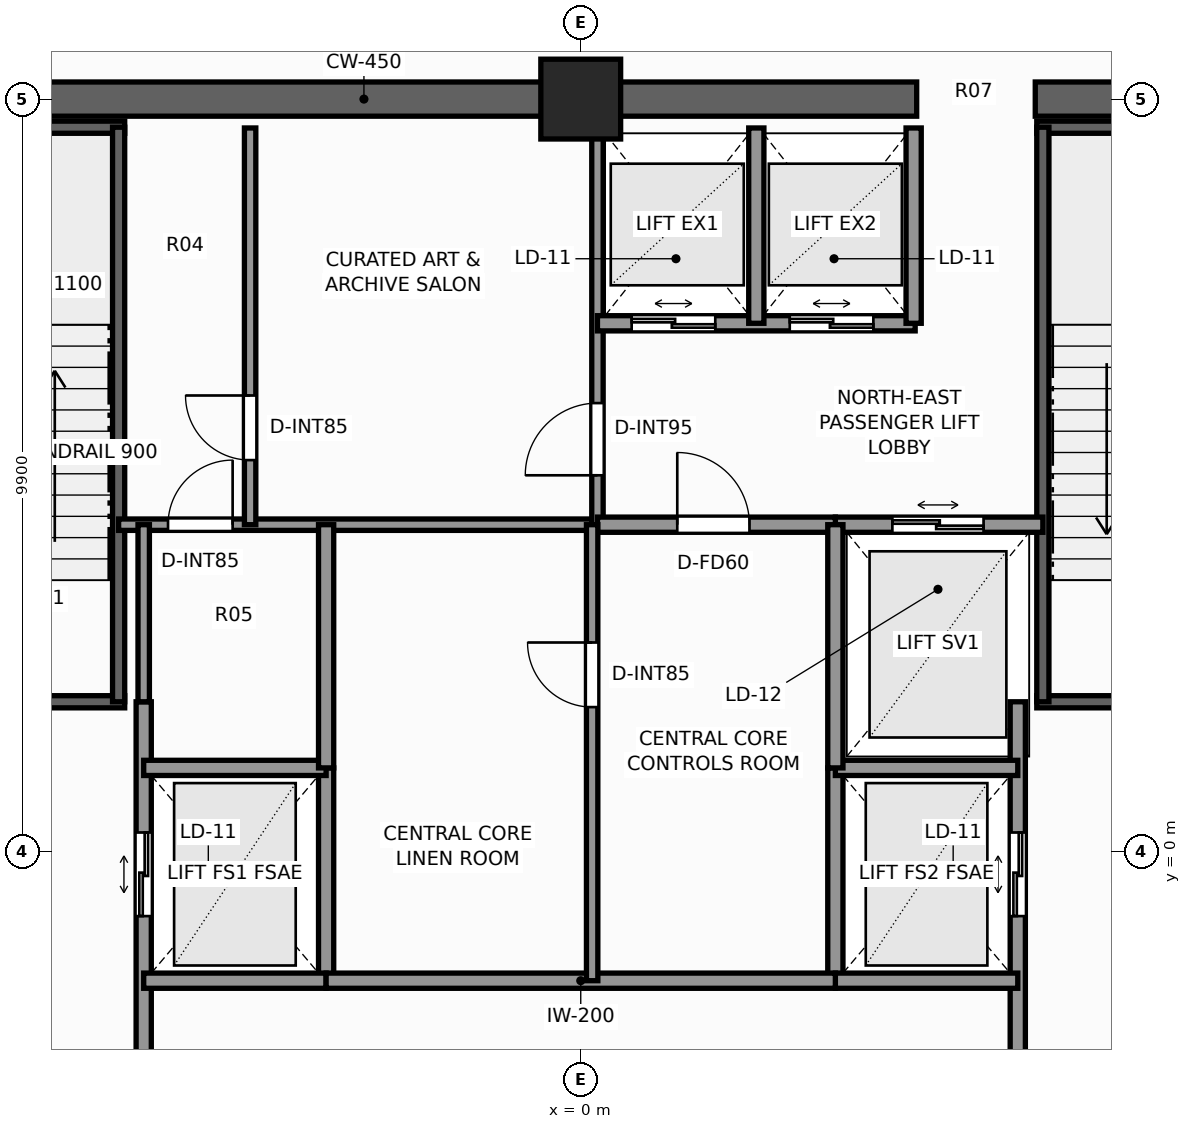
"""IFC4 building model, lengths in metres.
Left out: names, types, materials, properties, quantities, classifications, styles, units other than length and angle.
Written with IfcOpenShell. Run it as: python <this file> out.ifc"""

import sys

from ifc_helpers import new_model, si_unit, direction, frame, frame_2d, origin, origin_2d, place, context, subcontext, project, spatial, rectangle, extrude, element, fill, save


model = new_model("IFC4")
c1 = context("Model", 3, precision=1e-05, world=origin(), true_north=direction((0.0, 1.0)))
c2 = subcontext(c1, "Body", "Model", "MODEL_VIEW")
j1 = project(units=[si_unit("LENGTHUNIT", "METRE"), si_unit("PLANEANGLEUNIT", "RADIAN")], contexts=[c1])
p1 = place(None, origin())
s1 = spatial("IfcSite", under=j1, at=p1, CompositionType="ELEMENT")
p2 = place(p1, origin())
s2 = spatial("IfcBuilding", under=s1, at=p2, CompositionType="ELEMENT")
p3 = place(p2, frame((0.0, 0.0, 258.4)))
s3 = spatial("IfcBuildingStorey", under=s2, at=p3, CompositionType="ELEMENT", Elevation=258.4)
p4 = place(p3, frame((-10.125, 9.9, 0.0), z_axis=(0.0, 0.0, 1.0), x_axis=(1.0, 0.0, 0.0)))
e1 = element("IfcWall", 1, at=p4, inside=s3, PredefinedType="SHEAR", context=c2, shape_type="SweptSolid", body=[
    extrude(rectangle(XDim=14.545, YDim=0.45, at=frame_2d((7.272, 0.0))), origin(), (0.0, 0.0, 1.0), 4.4),
])
p5 = place(p3, frame((5.98, 9.9, 0.0), z_axis=(0.0, 0.0, 1.0), x_axis=(1.0, 0.0, 0.0)))
e2 = element("IfcWall", 2, at=p5, inside=s3, PredefinedType="SHEAR", context=c2, shape_type="SweptSolid", body=[
    extrude(rectangle(XDim=4.145, YDim=0.45, at=frame_2d((2.073, 0.0))), origin(), (0.0, 0.0, 1.0), 4.4),
])
p6 = place(p3, frame((0.0, 9.9, 0.0), z_axis=(0.0, 0.0, 1.0), x_axis=(1.0, 0.0, 0.0)))
e3 = element("IfcColumn", 3, at=p6, inside=s3, PredefinedType="COLUMN", context=c2, shape_type="SweptSolid", body=[
    extrude(rectangle(XDim=1.05, YDim=1.05, at=origin_2d()), origin(), (0.0, 0.0, 1.0), 4.4),
])
p7 = place(p3, frame((-9.52, 1.97, 0.0), z_axis=(0.0, 0.0, 1.0), x_axis=(1.0, 0.0, 0.0)))
e4 = element("IfcWall", 4, at=p7, inside=s3, PredefinedType="SHEAR", context=c2, shape_type="SweptSolid", body=[
    extrude(rectangle(XDim=3.52, YDim=0.16, at=frame_2d((1.76, 0.0))), origin(), (0.0, 0.0, 1.0), 4.4),
])
p8 = place(p7, frame((1.15, 0.0, 0.0)))
e5 = element("IfcOpeningElement", 5, at=p8, cuts=e4, PredefinedType="OPENING", context=c2, shape_type="SweptSolid", body=[
    extrude(rectangle(XDim=1.1, YDim=2.2, at=frame_2d((0.55, 1.1))), frame((0.0, 0.09, 0.0), z_axis=(0.0, -1.0, 0.0), x_axis=(1.0, 0.0, 0.0)), (0.0, 0.0, 1.0), 0.18),
])
p9 = place(p3, frame((-9.52, 9.53, 0.0), z_axis=(0.0, 0.0, 1.0), x_axis=(1.0, 0.0, 0.0)))
e6 = element("IfcWall", 6, at=p9, inside=s3, PredefinedType="SHEAR", context=c2, shape_type="SweptSolid", body=[
    extrude(rectangle(XDim=3.52, YDim=0.16, at=frame_2d((1.76, 0.0))), origin(), (0.0, 0.0, 1.0), 4.4),
])
p10 = place(p3, frame((-6.08, 1.97, 0.0), z_axis=(0.0, 0.0, 1.0), x_axis=(0.0, 1.0, 0.0)))
e7 = element("IfcWall", 7, at=p10, inside=s3, PredefinedType="SHEAR", context=c2, shape_type="SweptSolid", body=[
    extrude(rectangle(XDim=7.56, YDim=0.16, at=frame_2d((3.78, 0.0))), origin(), (0.0, 0.0, 1.0), 4.4),
])
p11 = place(p3, frame((6.0, 1.97, 0.0), z_axis=(0.0, 0.0, 1.0), x_axis=(1.0, 0.0, 0.0)))
e8 = element("IfcWall", 8, at=p11, inside=s3, PredefinedType="SHEAR", context=c2, shape_type="SweptSolid", body=[
    extrude(rectangle(XDim=3.52, YDim=0.16, at=frame_2d((1.76, 0.0))), origin(), (0.0, 0.0, 1.0), 4.4),
])
p12 = place(p11, frame((1.15, 0.0, 0.0)))
e9 = element("IfcOpeningElement", 9, at=p12, cuts=e8, PredefinedType="OPENING", context=c2, shape_type="SweptSolid", body=[
    extrude(rectangle(XDim=1.1, YDim=2.2, at=frame_2d((0.55, 1.1))), frame((0.0, 0.09, 0.0), z_axis=(0.0, -1.0, 0.0), x_axis=(1.0, 0.0, 0.0)), (0.0, 0.0, 1.0), 0.18),
])
p13 = place(p3, frame((6.0, 9.53, 0.0), z_axis=(0.0, 0.0, 1.0), x_axis=(1.0, 0.0, 0.0)))
e10 = element("IfcWall", 10, at=p13, inside=s3, PredefinedType="SHEAR", context=c2, shape_type="SweptSolid", body=[
    extrude(rectangle(XDim=3.52, YDim=0.16, at=frame_2d((1.76, 0.0))), origin(), (0.0, 0.0, 1.0), 4.4),
])
p14 = place(p3, frame((6.08, 1.97, 0.0), z_axis=(0.0, 0.0, 1.0), x_axis=(0.0, 1.0, 0.0)))
e11 = element("IfcWall", 11, at=p14, inside=s3, PredefinedType="SHEAR", context=c2, shape_type="SweptSolid", body=[
    extrude(rectangle(XDim=7.56, YDim=0.16, at=frame_2d((3.78, 0.0))), origin(), (0.0, 0.0, 1.0), 4.4),
])
p15 = place(p3, frame((-5.75, -3.6, 0.0), z_axis=(0.0, 0.0, 1.0), x_axis=(0.0, 1.0, 0.0)))
e12 = element("IfcWall", 12, at=p15, inside=s3, PredefinedType="SOLIDWALL", context=c2, shape_type="SweptSolid", body=[
    extrude(rectangle(XDim=5.57, YDim=0.2, at=frame_2d((2.785, 0.0))), origin(), (0.0, 0.0, 1.0), 4.12),
])
p16 = place(p15, frame((2.75, 0.0, 0.0)))
e13 = element("IfcOpeningElement", 13, at=p16, cuts=e12, PredefinedType="OPENING", context=c2, shape_type="SweptSolid", body=[
    extrude(rectangle(XDim=1.1, YDim=2.2, at=frame_2d((0.55, 1.1))), frame((0.0, 0.11, 0.0), z_axis=(0.0, -1.0, 0.0), x_axis=(1.0, 0.0, 0.0)), (0.0, 0.0, 1.0), 0.22),
])
p17 = place(p3, frame((-3.35, -1.7, 0.0), z_axis=(0.0, 0.0, 1.0), x_axis=(0.0, 1.0, 0.0)))
e14 = element("IfcWall", 14, at=p17, inside=s3, PredefinedType="SOLIDWALL", context=c2, shape_type="SweptSolid", body=[
    extrude(rectangle(XDim=2.8, YDim=0.2, at=frame_2d((1.4, 0.0))), origin(), (0.0, 0.0, 1.0), 4.12),
])
for number, where, z_axis, x_axis in (
    (15, (-5.75, -1.7, 0.0), (0.0, 0.0, 1.0), (1.0, 0.0, 0.0)),
    (16, (-5.75, 1.1, 0.0), (0.0, 0.0, 1.0), (1.0, 0.0, 0.0)),
):
    element("IfcWall", number, at=place(p3, frame(where, z_axis=z_axis, x_axis=x_axis)), inside=s3, PredefinedType="SOLIDWALL", context=c2, shape_type="SweptSolid", body=[
        extrude(rectangle(XDim=2.4, YDim=0.2, at=frame_2d((1.2, 0.0))), origin(), (0.0, 0.0, 1.0), 4.12),
    ])
p18 = place(p3, frame((5.75, -3.6, 0.0), z_axis=(0.0, 0.0, 1.0), x_axis=(0.0, 1.0, 0.0)))
e17 = element("IfcWall", 17, at=p18, inside=s3, PredefinedType="SOLIDWALL", context=c2, shape_type="SweptSolid", body=[
    extrude(rectangle(XDim=5.57, YDim=0.2, at=frame_2d((2.785, 0.0))), origin(), (0.0, 0.0, 1.0), 4.12),
])
p19 = place(p18, frame((2.75, 0.0, 0.0)))
e18 = element("IfcOpeningElement", 18, at=p19, cuts=e17, PredefinedType="OPENING", context=c2, shape_type="SweptSolid", body=[
    extrude(rectangle(XDim=1.1, YDim=2.2, at=frame_2d((0.55, 1.1))), frame((0.0, 0.11, 0.0), z_axis=(0.0, -1.0, 0.0), x_axis=(1.0, 0.0, 0.0)), (0.0, 0.0, 1.0), 0.22),
])
p20 = place(p3, frame((3.35, -1.7, 0.0), z_axis=(0.0, 0.0, 1.0), x_axis=(0.0, 1.0, 0.0)))
e19 = element("IfcWall", 19, at=p20, inside=s3, PredefinedType="SOLIDWALL", context=c2, shape_type="SweptSolid", body=[
    extrude(rectangle(XDim=2.8, YDim=0.2, at=frame_2d((1.4, 0.0))), origin(), (0.0, 0.0, 1.0), 4.12),
])
for number, where, z_axis, x_axis in (
    (20, (3.35, -1.7, 0.0), (0.0, 0.0, 1.0), (1.0, 0.0, 0.0)),
    (21, (3.35, 1.1, 0.0), (0.0, 0.0, 1.0), (1.0, 0.0, 0.0)),
):
    element("IfcWall", number, at=place(p3, frame(where, z_axis=z_axis, x_axis=x_axis)), inside=s3, PredefinedType="SOLIDWALL", context=c2, shape_type="SweptSolid", body=[
        extrude(rectangle(XDim=2.4, YDim=0.2, at=frame_2d((1.2, 0.0))), origin(), (0.0, 0.0, 1.0), 4.12),
    ])
p21 = place(p3, frame((3.35, 4.3, 0.0), z_axis=(0.0, 0.0, 1.0), x_axis=(1.0, 0.0, 0.0)))
e22 = element("IfcWall", 22, at=p21, inside=s3, PredefinedType="SOLIDWALL", context=c2, shape_type="SweptSolid", body=[
    extrude(rectangle(XDim=2.73, YDim=0.2, at=frame_2d((1.365, 0.0))), origin(), (0.0, 0.0, 1.0), 4.12),
])
p22 = place(p21, frame((0.75, 0.0, 0.0)))
e23 = element("IfcOpeningElement", 23, at=p22, cuts=e22, PredefinedType="OPENING", context=c2, shape_type="SweptSolid", body=[
    extrude(rectangle(XDim=1.2, YDim=2.25, at=frame_2d((0.6, 1.125))), frame((0.0, 0.11, 0.0), z_axis=(0.0, -1.0, 0.0), x_axis=(1.0, 0.0, 0.0)), (0.0, 0.0, 1.0), 0.22),
])
p23 = place(p3, frame((-6.08, 4.3, 0.0), z_axis=(0.0, 0.0, 1.0), x_axis=(1.0, 0.0, 0.0)))
e24 = element("IfcWall", 24, at=p23, inside=s3, PredefinedType="PARTITIONING", context=c2, shape_type="SweptSolid", body=[
    extrude(rectangle(XDim=6.3, YDim=0.15, at=frame_2d((3.15, 0.0))), origin(), (0.0, 0.0, 1.0), 4.12),
])
p24 = place(p23, frame((0.65, 0.0, 0.0)))
e25 = element("IfcOpeningElement", 25, at=p24, cuts=e24, PredefinedType="OPENING", context=c2, shape_type="SweptSolid", body=[
    extrude(rectangle(XDim=0.85, YDim=2.03, at=frame_2d((0.425, 1.015))), frame((0.0, 0.085, 0.0), z_axis=(0.0, -1.0, 0.0), x_axis=(1.0, 0.0, 0.0)), (0.0, 0.0, 1.0), 0.17),
])
p25 = place(p3, frame((0.22, 4.3, 0.0), z_axis=(0.0, 0.0, 1.0), x_axis=(0.0, 1.0, 0.0)))
e26 = element("IfcWall", 26, at=p25, inside=s3, PredefinedType="PARTITIONING", context=c2, shape_type="SweptSolid", body=[
    extrude(rectangle(XDim=5.22, YDim=0.15, at=frame_2d((2.61, 0.0))), origin(), (0.0, 0.0, 1.0), 4.12),
])
p26 = place(p25, frame((0.65, 0.0, 0.0)))
e27 = element("IfcOpeningElement", 27, at=p26, cuts=e26, PredefinedType="OPENING", context=c2, shape_type="SweptSolid", body=[
    extrude(rectangle(XDim=0.95, YDim=2.06, at=frame_2d((0.475, 1.03))), frame((0.0, 0.085, 0.0), z_axis=(0.0, -1.0, 0.0), x_axis=(1.0, 0.0, 0.0)), (0.0, 0.0, 1.0), 0.17),
])
p27 = place(p3, frame((-4.35, 4.3, 0.0), z_axis=(0.0, 0.0, 1.0), x_axis=(0.0, 1.0, 0.0)))
e28 = element("IfcWall", 28, at=p27, inside=s3, PredefinedType="PARTITIONING", context=c2, shape_type="SweptSolid", body=[
    extrude(rectangle(XDim=5.22, YDim=0.15, at=frame_2d((2.61, 0.0))), origin(), (0.0, 0.0, 1.0), 4.12),
])
p28 = place(p27, frame((0.85, 0.0, 0.0)))
e29 = element("IfcOpeningElement", 29, at=p28, cuts=e28, PredefinedType="OPENING", context=c2, shape_type="SweptSolid", body=[
    extrude(rectangle(XDim=0.85, YDim=2.03, at=frame_2d((0.425, 1.015))), frame((0.0, 0.085, 0.0), z_axis=(0.0, -1.0, 0.0), x_axis=(1.0, 0.0, 0.0)), (0.0, 0.0, 1.0), 0.17),
])
p29 = place(p3, frame((0.22, 6.95, 0.0), z_axis=(0.0, 0.0, 1.0), x_axis=(1.0, 0.0, 0.0)))
e30 = element("IfcWall", 30, at=p29, inside=s3, PredefinedType="SOLIDWALL", context=c2, shape_type="SweptSolid", body=[
    extrude(rectangle(XDim=4.18, YDim=0.2, at=frame_2d((2.09, 0.0))), origin(), (0.0, 0.0, 1.0), 4.12),
])
p30 = place(p29, frame((0.45, 0.0, 0.0)))
e31 = element("IfcOpeningElement", 31, at=p30, cuts=e30, PredefinedType="OPENING", context=c2, shape_type="SweptSolid", body=[
    extrude(rectangle(XDim=1.1, YDim=2.2, at=frame_2d((0.55, 1.1))), frame((0.0, 0.11, 0.0), z_axis=(0.0, -1.0, 0.0), x_axis=(1.0, 0.0, 0.0)), (0.0, 0.0, 1.0), 0.22),
])
p31 = place(p29, frame((2.53, 0.0, 0.0)))
e32 = element("IfcOpeningElement", 32, at=p31, cuts=e30, PredefinedType="OPENING", context=c2, shape_type="SweptSolid", body=[
    extrude(rectangle(XDim=1.1, YDim=2.2, at=frame_2d((0.55, 1.1))), frame((0.0, 0.11, 0.0), z_axis=(0.0, -1.0, 0.0), x_axis=(1.0, 0.0, 0.0)), (0.0, 0.0, 1.0), 0.22),
])
for number, where, z_axis, x_axis in (
    (33, (4.38, 6.95, 0.0), (0.0, 0.0, 1.0), (0.0, 1.0, 0.0)),
    (34, (2.31, 6.95, 0.0), (0.0, 0.0, 1.0), (0.0, 1.0, 0.0)),
):
    element("IfcWall", number, at=place(p3, frame(where, z_axis=z_axis, x_axis=x_axis)), inside=s3, PredefinedType="SOLIDWALL", context=c2, shape_type="SweptSolid", body=[
        extrude(rectangle(XDim=2.57, YDim=0.2, at=frame_2d((1.285, 0.0))), origin(), (0.0, 0.0, 1.0), 4.12),
    ])
p32 = place(p3, frame((0.22, 4.3, 0.0), z_axis=(0.0, 0.0, 1.0), x_axis=(1.0, 0.0, 0.0)))
e35 = element("IfcWall", 35, at=p32, inside=s3, PredefinedType="SOLIDWALL", context=c2, shape_type="SweptSolid", body=[
    extrude(rectangle(XDim=3.13, YDim=0.2, at=frame_2d((1.565, 0.0))), origin(), (0.0, 0.0, 1.0), 4.12),
])
p33 = place(p32, frame((1.05, 0.0, 0.0)))
e36 = element("IfcOpeningElement", 36, at=p33, cuts=e35, PredefinedType="OPENING", context=c2, shape_type="SweptSolid", body=[
    extrude(rectangle(XDim=0.95, YDim=2.06, at=frame_2d((0.475, 1.03))), frame((0.0, 0.11, 0.0), z_axis=(0.0, -1.0, 0.0), x_axis=(1.0, 0.0, 0.0)), (0.0, 0.0, 1.0), 0.22),
])
p34 = place(p3, frame((-3.35, -1.7, 0.0), z_axis=(0.0, 0.0, 1.0), x_axis=(1.0, 0.0, 0.0)))
e37 = element("IfcWall", 37, at=p34, inside=s3, PredefinedType="SOLIDWALL", context=c2, shape_type="SweptSolid", body=[
    extrude(rectangle(XDim=6.7, YDim=0.2, at=frame_2d((3.35, 0.0))), origin(), (0.0, 0.0, 1.0), 4.12),
])
for number, where, z_axis, x_axis in (
    (38, (-3.35, 1.1, 0.0), (0.0, 0.0, 1.0), (0.0, 1.0, 0.0)),
    (39, (3.35, 1.1, 0.0), (0.0, 0.0, 1.0), (0.0, 1.0, 0.0)),
):
    element("IfcWall", number, at=place(p3, frame(where, z_axis=z_axis, x_axis=x_axis)), inside=s3, PredefinedType="SOLIDWALL", context=c2, shape_type="SweptSolid", body=[
        extrude(rectangle(XDim=3.2, YDim=0.2, at=frame_2d((1.6, 0.0))), origin(), (0.0, 0.0, 1.0), 4.12),
    ])
p35 = place(p3, frame((0.15, -1.7, 0.0), z_axis=(0.0, 0.0, 1.0), x_axis=(0.0, 1.0, 0.0)))
e40 = element("IfcWall", 40, at=p35, inside=s3, PredefinedType="PARTITIONING", context=c2, shape_type="SweptSolid", body=[
    extrude(rectangle(XDim=6.0, YDim=0.15, at=frame_2d((3.0, 0.0))), origin(), (0.0, 0.0, 1.0), 4.12),
])
p36 = place(p35, frame((3.6, 0.0, 0.0)))
e41 = element("IfcOpeningElement", 41, at=p36, cuts=e40, PredefinedType="OPENING", context=c2, shape_type="SweptSolid", body=[
    extrude(rectangle(XDim=0.85, YDim=2.03, at=frame_2d((0.425, 1.015))), frame((0.0, 0.085, 0.0), z_axis=(0.0, -1.0, 0.0), x_axis=(1.0, 0.0, 0.0)), (0.0, 0.0, 1.0), 0.17),
])
p37 = place(p3, frame((-5.75, 1.97, 0.0), z_axis=(0.0, 0.0, 1.0), x_axis=(0.0, 1.0, 0.0)))
e42 = element("IfcWall", 42, at=p37, inside=s3, PredefinedType="PARTITIONING", context=c2, shape_type="SweptSolid", body=[
    extrude(rectangle(XDim=2.33, YDim=0.15, at=frame_2d((1.165, 0.0))), origin(), (0.0, 0.0, 1.0), 4.12),
])
p38 = place(p16, origin())
e43 = element("IfcDoor", 43, at=p38, inside=s3, OperationType="DOUBLE_DOOR_SLIDING", PredefinedType="DOOR", context=c2, shape_type="SweptSolid", body=[
    extrude(rectangle(XDim=1.1, YDim=2.2, at=frame_2d((0.55, 1.1))), frame((0.0, 0.025, 0.0), z_axis=(0.0, -1.0, 0.0), x_axis=(1.0, 0.0, 0.0)), (0.0, 0.0, 1.0), 0.05),
])
fill(e13, e43)
p39 = place(p19, origin())
e44 = element("IfcDoor", 44, at=p39, inside=s3, OperationType="DOUBLE_DOOR_SLIDING", PredefinedType="DOOR", context=c2, shape_type="SweptSolid", body=[
    extrude(rectangle(XDim=1.1, YDim=2.2, at=frame_2d((0.55, 1.1))), frame((0.0, 0.025, 0.0), z_axis=(0.0, -1.0, 0.0), x_axis=(1.0, 0.0, 0.0)), (0.0, 0.0, 1.0), 0.05),
])
fill(e18, e44)
p40 = place(p22, origin())
e45 = element("IfcDoor", 45, at=p40, inside=s3, OperationType="DOUBLE_DOOR_SLIDING", PredefinedType="DOOR", context=c2, shape_type="SweptSolid", body=[
    extrude(rectangle(XDim=1.2, YDim=2.25, at=frame_2d((0.6, 1.125))), frame((0.0, 0.025, 0.0), z_axis=(0.0, -1.0, 0.0), x_axis=(1.0, 0.0, 0.0)), (0.0, 0.0, 1.0), 0.05),
])
fill(e23, e45)
p41 = place(p26, origin())
e46 = element("IfcDoor", 46, at=p41, inside=s3, OperationType="SINGLE_SWING_LEFT", PredefinedType="DOOR", context=c2, shape_type="SweptSolid", body=[
    extrude(rectangle(XDim=0.95, YDim=2.06, at=frame_2d((0.475, 1.03))), frame((0.0, 0.025, 0.0), z_axis=(0.0, -1.0, 0.0), x_axis=(1.0, 0.0, 0.0)), (0.0, 0.0, 1.0), 0.05),
])
fill(e27, e46)
p42 = place(p28, origin())
e47 = element("IfcDoor", 47, at=p42, inside=s3, OperationType="SINGLE_SWING_RIGHT", PredefinedType="DOOR", context=c2, shape_type="SweptSolid", body=[
    extrude(rectangle(XDim=0.85, YDim=2.03, at=frame_2d((0.425, 1.015))), frame((0.0, 0.025, 0.0), z_axis=(0.0, -1.0, 0.0), x_axis=(1.0, 0.0, 0.0)), (0.0, 0.0, 1.0), 0.05),
])
fill(e29, e47)
p43 = place(p30, origin())
e48 = element("IfcDoor", 48, at=p43, inside=s3, OperationType="DOUBLE_DOOR_SLIDING", PredefinedType="DOOR", context=c2, shape_type="SweptSolid", body=[
    extrude(rectangle(XDim=1.1, YDim=2.2, at=frame_2d((0.55, 1.1))), frame((0.0, 0.025, 0.0), z_axis=(0.0, -1.0, 0.0), x_axis=(1.0, 0.0, 0.0)), (0.0, 0.0, 1.0), 0.05),
])
fill(e31, e48)
p44 = place(p31, origin())
e49 = element("IfcDoor", 49, at=p44, inside=s3, OperationType="DOUBLE_DOOR_SLIDING", PredefinedType="DOOR", context=c2, shape_type="SweptSolid", body=[
    extrude(rectangle(XDim=1.1, YDim=2.2, at=frame_2d((0.55, 1.1))), frame((0.0, 0.025, 0.0), z_axis=(0.0, -1.0, 0.0), x_axis=(1.0, 0.0, 0.0)), (0.0, 0.0, 1.0), 0.05),
])
fill(e32, e49)
p45 = place(p33, origin())
e50 = element("IfcDoor", 50, at=p45, inside=s3, OperationType="SINGLE_SWING_LEFT", PredefinedType="DOOR", context=c2, shape_type="SweptSolid", body=[
    extrude(rectangle(XDim=0.95, YDim=2.06, at=frame_2d((0.475, 1.03))), frame((0.0, 0.025, 0.0), z_axis=(0.0, -1.0, 0.0), x_axis=(1.0, 0.0, 0.0)), (0.0, 0.0, 1.0), 0.05),
])
fill(e36, e50)
p46 = place(p36, origin())
e51 = element("IfcDoor", 51, at=p46, inside=s3, OperationType="SINGLE_SWING_RIGHT", PredefinedType="DOOR", context=c2, shape_type="SweptSolid", body=[
    extrude(rectangle(XDim=0.85, YDim=2.03, at=frame_2d((0.425, 1.015))), frame((0.0, 0.025, 0.0), z_axis=(0.0, -1.0, 0.0), x_axis=(1.0, 0.0, 0.0)), (0.0, 0.0, 1.0), 0.05),
])
fill(e41, e51)
p47 = place(p24, origin())
e52 = element("IfcDoor", 52, at=p47, inside=s3, OperationType="SINGLE_SWING_RIGHT", PredefinedType="DOOR", context=c2, shape_type="SweptSolid", body=[
    extrude(rectangle(XDim=0.85, YDim=2.03, at=frame_2d((0.425, 1.015))), frame((0.0, 0.025, 0.0), z_axis=(0.0, -1.0, 0.0), x_axis=(1.0, 0.0, 0.0)), (0.0, 0.0, 1.0), 0.05),
])
fill(e25, e52)
save(model, sys.argv[1])
